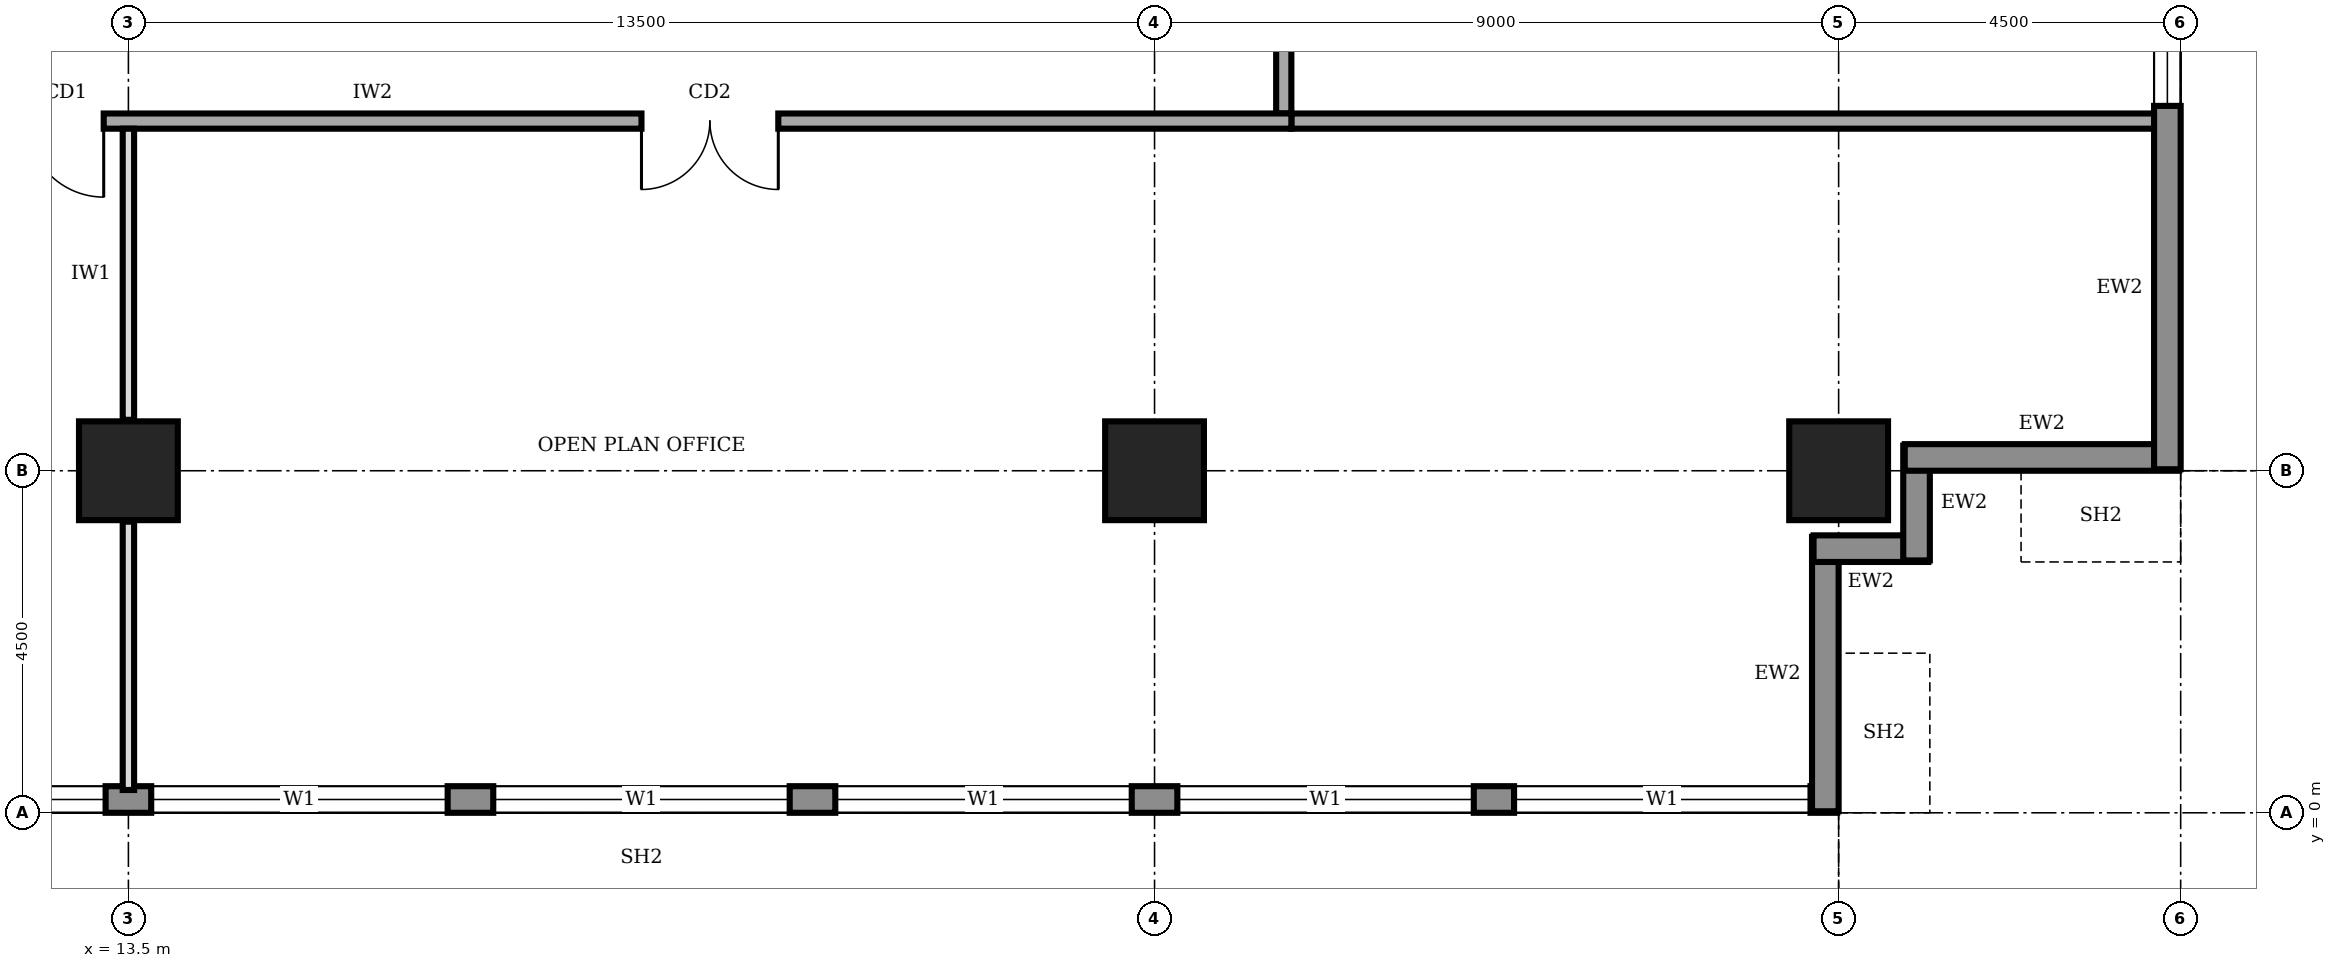
"""IFC4 building model, lengths in metres.
Left out: names, types, materials, properties, quantities, classifications, styles, units other than length and angle.
Written with IfcOpenShell. Run it as: python <this file> out.ifc"""

import sys

from ifc_helpers import new_model, si_unit, direction, frame, frame_2d, origin, origin_2d, place, context, subcontext, project, spatial, rectangle, extrude, element, fill, save


model = new_model("IFC4")
c1 = context("Model", 3, precision=1e-05, world=origin(), true_north=direction((0.0, 1.0)))
c2 = subcontext(c1, "Body", "Model", "MODEL_VIEW")
j1 = project(units=[si_unit("LENGTHUNIT", "METRE"), si_unit("PLANEANGLEUNIT", "RADIAN")], contexts=[c1])
p1 = place(None, origin())
s1 = spatial("IfcSite", under=j1, at=p1, CompositionType="ELEMENT")
p2 = place(p1, origin())
s2 = spatial("IfcBuilding", under=s1, at=p2, CompositionType="ELEMENT")
p3 = place(p2, frame((0.0, 0.0, 281.0)))
s3 = spatial("IfcBuildingStorey", under=s2, at=p3, CompositionType="ELEMENT", Elevation=281.0)
for number, where, z_axis, x_axis in (
    (1, (13.5, 4.5, 0.0), (0.0, 0.0, 1.0), (1.0, 0.0, 0.0)),
    (2, (27.0, 4.5, 0.0), (0.0, 0.0, 1.0), (1.0, 0.0, 0.0)),
    (3, (36.0, 4.5, 0.0), (0.0, 0.0, 1.0), (1.0, 0.0, 0.0)),
):
    element("IfcColumn", number, at=place(p3, frame(where, z_axis=z_axis, x_axis=x_axis)), inside=s3, PredefinedType="COLUMN", context=c2, shape_type="SweptSolid", body=[
        extrude(rectangle(XDim=1.3, YDim=1.3, at=origin_2d()), origin(), (0.0, 0.0, 1.0), 4.0),
    ])
p4 = place(p3, frame((4.52, 0.175, 0.0), z_axis=(0.0, 0.0, 1.0), x_axis=(1.0, 0.0, 0.0)))
e4 = element("IfcWall", 4, at=p4, inside=s3, PredefinedType="STANDARD", context=c2, shape_type="SweptSolid", body=[
    extrude(rectangle(XDim=31.46, YDim=0.35, at=frame_2d((15.73, 0.0))), origin(), (0.0, 0.0, 1.0), 3.75),
])
p5 = place(p4, frame((4.78, 0.0, 0.9)))
e5 = element("IfcOpeningElement", 5, at=p5, cuts=e4, PredefinedType="OPENING", context=c2, shape_type="SweptSolid", body=[
    extrude(rectangle(XDim=3.9, YDim=2.2, at=frame_2d((1.95, 1.1))), frame((0.0, 0.185, 0.0), z_axis=(0.0, -1.0, 0.0), x_axis=(1.0, 0.0, 0.0)), (0.0, 0.0, 1.0), 0.37),
])
p6 = place(p4, frame((9.28, 0.0, 0.9)))
e6 = element("IfcOpeningElement", 6, at=p6, cuts=e4, PredefinedType="OPENING", context=c2, shape_type="SweptSolid", body=[
    extrude(rectangle(XDim=3.9, YDim=2.2, at=frame_2d((1.95, 1.1))), frame((0.0, 0.185, 0.0), z_axis=(0.0, -1.0, 0.0), x_axis=(1.0, 0.0, 0.0)), (0.0, 0.0, 1.0), 0.37),
])
p7 = place(p4, frame((13.78, 0.0, 0.9)))
e7 = element("IfcOpeningElement", 7, at=p7, cuts=e4, PredefinedType="OPENING", context=c2, shape_type="SweptSolid", body=[
    extrude(rectangle(XDim=3.9, YDim=2.2, at=frame_2d((1.95, 1.1))), frame((0.0, 0.185, 0.0), z_axis=(0.0, -1.0, 0.0), x_axis=(1.0, 0.0, 0.0)), (0.0, 0.0, 1.0), 0.37),
])
p8 = place(p4, frame((18.28, 0.0, 0.9)))
e8 = element("IfcOpeningElement", 8, at=p8, cuts=e4, PredefinedType="OPENING", context=c2, shape_type="SweptSolid", body=[
    extrude(rectangle(XDim=3.9, YDim=2.2, at=frame_2d((1.95, 1.1))), frame((0.0, 0.185, 0.0), z_axis=(0.0, -1.0, 0.0), x_axis=(1.0, 0.0, 0.0)), (0.0, 0.0, 1.0), 0.37),
])
p9 = place(p4, frame((22.78, 0.0, 0.9)))
e9 = element("IfcOpeningElement", 9, at=p9, cuts=e4, PredefinedType="OPENING", context=c2, shape_type="SweptSolid", body=[
    extrude(rectangle(XDim=3.9, YDim=2.2, at=frame_2d((1.95, 1.1))), frame((0.0, 0.185, 0.0), z_axis=(0.0, -1.0, 0.0), x_axis=(1.0, 0.0, 0.0)), (0.0, 0.0, 1.0), 0.37),
])
p10 = place(p4, frame((27.21, 0.0, 0.9)))
e10 = element("IfcOpeningElement", 10, at=p10, cuts=e4, PredefinedType="OPENING", context=c2, shape_type="SweptSolid", body=[
    extrude(rectangle(XDim=3.9, YDim=2.2, at=frame_2d((1.95, 1.1))), frame((0.0, 0.185, 0.0), z_axis=(0.0, -1.0, 0.0), x_axis=(1.0, 0.0, 0.0)), (0.0, 0.0, 1.0), 0.37),
])
p11 = place(p3, frame((35.825, 0.02, 0.0), z_axis=(0.0, 0.0, 1.0), x_axis=(0.0, 1.0, 0.0)))
e11 = element("IfcWall", 11, at=p11, inside=s3, PredefinedType="STANDARD", context=c2, shape_type="SweptSolid", body=[
    extrude(rectangle(XDim=3.61, YDim=0.35, at=frame_2d((1.805, 0.0))), origin(), (0.0, 0.0, 1.0), 2.85),
])
for number, where, z_axis, x_axis in (
    (12, (35.67, 3.475, 0.0), (0.0, 0.0, 1.0), (1.0, 0.0, 0.0)),
    (13, (37.025, 3.32, 0.0), (0.0, 0.0, 1.0), (0.0, 1.0, 0.0)),
):
    element("IfcWall", number, at=place(p3, frame(where, z_axis=z_axis, x_axis=x_axis)), inside=s3, PredefinedType="STANDARD", context=c2, shape_type="SweptSolid", body=[
        extrude(rectangle(XDim=1.51, YDim=0.35, at=frame_2d((0.755, 0.0))), origin(), (0.0, 0.0, 1.0), 3.75),
    ])
p12 = place(p3, frame((36.87, 4.675, 0.0), z_axis=(0.0, 0.0, 1.0), x_axis=(1.0, 0.0, 0.0)))
e14 = element("IfcWall", 14, at=p12, inside=s3, PredefinedType="STANDARD", context=c2, shape_type="SweptSolid", body=[
    extrude(rectangle(XDim=3.61, YDim=0.35, at=frame_2d((1.805, 0.0))), origin(), (0.0, 0.0, 1.0), 2.85),
])
p13 = place(p3, frame((40.325, 4.52, 0.0), z_axis=(0.0, 0.0, 1.0), x_axis=(0.0, 1.0, 0.0)))
e15 = element("IfcWall", 15, at=p13, inside=s3, PredefinedType="STANDARD", context=c2, shape_type="SweptSolid", body=[
    extrude(rectangle(XDim=31.46, YDim=0.35, at=frame_2d((15.73, 0.0))), origin(), (0.0, 0.0, 1.0), 3.75),
])
p14 = place(p13, frame((4.78, 0.0, 0.9)))
e16 = element("IfcOpeningElement", 16, at=p14, cuts=e15, PredefinedType="OPENING", context=c2, shape_type="SweptSolid", body=[
    extrude(rectangle(XDim=3.9, YDim=2.2, at=frame_2d((1.95, 1.1))), frame((0.0, 0.185, 0.0), z_axis=(0.0, -1.0, 0.0), x_axis=(1.0, 0.0, 0.0)), (0.0, 0.0, 1.0), 0.37),
])
p15 = place(p13, frame((9.28, 0.0, 0.9)))
e17 = element("IfcOpeningElement", 17, at=p15, cuts=e15, PredefinedType="OPENING", context=c2, shape_type="SweptSolid", body=[
    extrude(rectangle(XDim=3.9, YDim=2.2, at=frame_2d((1.95, 1.1))), frame((0.0, 0.185, 0.0), z_axis=(0.0, -1.0, 0.0), x_axis=(1.0, 0.0, 0.0)), (0.0, 0.0, 1.0), 0.37),
])
p16 = place(p13, frame((13.78, 0.0, 0.9)))
e18 = element("IfcOpeningElement", 18, at=p16, cuts=e15, PredefinedType="OPENING", context=c2, shape_type="SweptSolid", body=[
    extrude(rectangle(XDim=3.9, YDim=2.2, at=frame_2d((1.95, 1.1))), frame((0.0, 0.185, 0.0), z_axis=(0.0, -1.0, 0.0), x_axis=(1.0, 0.0, 0.0)), (0.0, 0.0, 1.0), 0.37),
])
p17 = place(p13, frame((18.28, 0.0, 0.9)))
e19 = element("IfcOpeningElement", 19, at=p17, cuts=e15, PredefinedType="OPENING", context=c2, shape_type="SweptSolid", body=[
    extrude(rectangle(XDim=3.9, YDim=2.2, at=frame_2d((1.95, 1.1))), frame((0.0, 0.185, 0.0), z_axis=(0.0, -1.0, 0.0), x_axis=(1.0, 0.0, 0.0)), (0.0, 0.0, 1.0), 0.37),
])
p18 = place(p13, frame((22.78, 0.0, 0.9)))
e20 = element("IfcOpeningElement", 20, at=p18, cuts=e15, PredefinedType="OPENING", context=c2, shape_type="SweptSolid", body=[
    extrude(rectangle(XDim=3.9, YDim=2.2, at=frame_2d((1.95, 1.1))), frame((0.0, 0.185, 0.0), z_axis=(0.0, -1.0, 0.0), x_axis=(1.0, 0.0, 0.0)), (0.0, 0.0, 1.0), 0.37),
])
p19 = place(p13, frame((27.21, 0.0, 0.9)))
e21 = element("IfcOpeningElement", 21, at=p19, cuts=e15, PredefinedType="OPENING", context=c2, shape_type="SweptSolid", body=[
    extrude(rectangle(XDim=3.9, YDim=2.2, at=frame_2d((1.95, 1.1))), frame((0.0, 0.185, 0.0), z_axis=(0.0, -1.0, 0.0), x_axis=(1.0, 0.0, 0.0)), (0.0, 0.0, 1.0), 0.37),
])
p20 = place(p3, frame((11.9, 9.1, 0.0), z_axis=(0.0, 0.0, 1.0), x_axis=(1.0, 0.0, 0.0)))
e22 = element("IfcWall", 22, at=p20, inside=s3, PredefinedType="SOLIDWALL", context=c2, shape_type="SweptSolid", body=[
    extrude(rectangle(XDim=16.9, YDim=0.2, at=frame_2d((8.45, 0.0))), origin(), (0.0, 0.0, 1.0), 3.75),
])
p21 = place(p20, frame((0.275, 0.0, 0.0)))
e23 = element("IfcOpeningElement", 23, at=p21, cuts=e22, PredefinedType="OPENING", context=c2, shape_type="SweptSolid", body=[
    extrude(rectangle(XDim=1.0, YDim=2.1, at=frame_2d((0.5, 1.05))), frame((0.0, 0.11, 0.0), z_axis=(0.0, -1.0, 0.0), x_axis=(1.0, 0.0, 0.0)), (0.0, 0.0, 1.0), 0.22),
])
p22 = place(p20, frame((8.35, 0.0, 0.0)))
e24 = element("IfcOpeningElement", 24, at=p22, cuts=e22, PredefinedType="OPENING", context=c2, shape_type="SweptSolid", body=[
    extrude(rectangle(XDim=1.8, YDim=2.1, at=frame_2d((0.9, 1.05))), frame((0.0, 0.11, 0.0), z_axis=(0.0, -1.0, 0.0), x_axis=(1.0, 0.0, 0.0)), (0.0, 0.0, 1.0), 0.22),
])
p23 = place(p3, frame((28.7, 9.2, 0.0), z_axis=(0.0, 0.0, 1.0), x_axis=(0.0, 1.0, 0.0)))
e25 = element("IfcWall", 25, at=p23, inside=s3, PredefinedType="SOLIDWALL", context=c2, shape_type="SweptSolid", body=[
    extrude(rectangle(XDim=23.8, YDim=0.2, at=frame_2d((11.9, 0.0))), origin(), (0.0, 0.0, 1.0), 3.75),
])
p24 = place(p23, frame((3.4, 0.0, 0.0)))
e26 = element("IfcOpeningElement", 26, at=p24, cuts=e25, PredefinedType="OPENING", context=c2, shape_type="SweptSolid", body=[
    extrude(rectangle(XDim=1.8, YDim=2.1, at=frame_2d((0.9, 1.05))), frame((0.0, 0.11, 0.0), z_axis=(0.0, -1.0, 0.0), x_axis=(1.0, 0.0, 0.0)), (0.0, 0.0, 1.0), 0.22),
])
p25 = place(p23, frame((10.55, 0.0, 0.0)))
e27 = element("IfcOpeningElement", 27, at=p25, cuts=e25, PredefinedType="OPENING", context=c2, shape_type="SweptSolid", body=[
    extrude(rectangle(XDim=1.0, YDim=2.1, at=frame_2d((0.5, 1.05))), frame((0.0, 0.11, 0.0), z_axis=(0.0, -1.0, 0.0), x_axis=(1.0, 0.0, 0.0)), (0.0, 0.0, 1.0), 0.22),
])
p26 = place(p23, frame((17.65, 0.0, 0.0)))
e28 = element("IfcOpeningElement", 28, at=p26, cuts=e25, PredefinedType="OPENING", context=c2, shape_type="SweptSolid", body=[
    extrude(rectangle(XDim=1.8, YDim=2.1, at=frame_2d((0.9, 1.05))), frame((0.0, 0.11, 0.0), z_axis=(0.0, -1.0, 0.0), x_axis=(1.0, 0.0, 0.0)), (0.0, 0.0, 1.0), 0.22),
])
p27 = place(p3, frame((28.8, 9.1, 0.0), z_axis=(0.0, 0.0, 1.0), x_axis=(1.0, 0.0, 0.0)))
e29 = element("IfcWall", 29, at=p27, inside=s3, PredefinedType="SOLIDWALL", context=c2, shape_type="SweptSolid", body=[
    extrude(rectangle(XDim=11.4, YDim=0.2, at=frame_2d((5.7, 0.0))), origin(), (0.0, 0.0, 1.0), 3.75),
])
p28 = place(p3, frame((13.5, 0.3, 0.0), z_axis=(0.0, 0.0, 1.0), x_axis=(0.0, 1.0, 0.0)))
e30 = element("IfcWall", 30, at=p28, inside=s3, PredefinedType="PARTITIONING", context=c2, shape_type="SweptSolid", body=[
    extrude(rectangle(XDim=3.53, YDim=0.15, at=frame_2d((1.765, 0.0))), origin(), (0.0, 0.0, 1.0), 2.85),
])
p29 = place(p3, frame((13.5, 5.17, 0.0), z_axis=(0.0, 0.0, 1.0), x_axis=(0.0, 1.0, 0.0)))
e31 = element("IfcWall", 31, at=p29, inside=s3, PredefinedType="PARTITIONING", context=c2, shape_type="SweptSolid", body=[
    extrude(rectangle(XDim=3.83, YDim=0.15, at=frame_2d((1.915, 0.0))), origin(), (0.0, 0.0, 1.0), 2.85),
])
p30 = place(p5, origin())
e32 = element("IfcWindow", 32, at=p30, inside=s3, PartitioningType="SINGLE_PANEL", PredefinedType="WINDOW", context=c2, shape_type="SweptSolid", body=[
    extrude(rectangle(XDim=3.9, YDim=2.2, at=frame_2d((1.95, 1.1))), frame((0.0, 0.03, 0.0), z_axis=(0.0, -1.0, 0.0), x_axis=(1.0, 0.0, 0.0)), (0.0, 0.0, 1.0), 0.06),
])
fill(e5, e32)
p31 = place(p6, origin())
e33 = element("IfcWindow", 33, at=p31, inside=s3, PartitioningType="SINGLE_PANEL", PredefinedType="WINDOW", context=c2, shape_type="SweptSolid", body=[
    extrude(rectangle(XDim=3.9, YDim=2.2, at=frame_2d((1.95, 1.1))), frame((0.0, 0.03, 0.0), z_axis=(0.0, -1.0, 0.0), x_axis=(1.0, 0.0, 0.0)), (0.0, 0.0, 1.0), 0.06),
])
fill(e6, e33)
p32 = place(p7, origin())
e34 = element("IfcWindow", 34, at=p32, inside=s3, PartitioningType="SINGLE_PANEL", PredefinedType="WINDOW", context=c2, shape_type="SweptSolid", body=[
    extrude(rectangle(XDim=3.9, YDim=2.2, at=frame_2d((1.95, 1.1))), frame((0.0, 0.03, 0.0), z_axis=(0.0, -1.0, 0.0), x_axis=(1.0, 0.0, 0.0)), (0.0, 0.0, 1.0), 0.06),
])
fill(e7, e34)
p33 = place(p8, origin())
e35 = element("IfcWindow", 35, at=p33, inside=s3, PartitioningType="SINGLE_PANEL", PredefinedType="WINDOW", context=c2, shape_type="SweptSolid", body=[
    extrude(rectangle(XDim=3.9, YDim=2.2, at=frame_2d((1.95, 1.1))), frame((0.0, 0.03, 0.0), z_axis=(0.0, -1.0, 0.0), x_axis=(1.0, 0.0, 0.0)), (0.0, 0.0, 1.0), 0.06),
])
fill(e8, e35)
p34 = place(p9, origin())
e36 = element("IfcWindow", 36, at=p34, inside=s3, PartitioningType="SINGLE_PANEL", PredefinedType="WINDOW", context=c2, shape_type="SweptSolid", body=[
    extrude(rectangle(XDim=3.9, YDim=2.2, at=frame_2d((1.95, 1.1))), frame((0.0, 0.03, 0.0), z_axis=(0.0, -1.0, 0.0), x_axis=(1.0, 0.0, 0.0)), (0.0, 0.0, 1.0), 0.06),
])
fill(e9, e36)
p35 = place(p10, origin())
e37 = element("IfcWindow", 37, at=p35, inside=s3, PartitioningType="SINGLE_PANEL", PredefinedType="WINDOW", context=c2, shape_type="SweptSolid", body=[
    extrude(rectangle(XDim=3.9, YDim=2.2, at=frame_2d((1.95, 1.1))), frame((0.0, 0.03, 0.0), z_axis=(0.0, -1.0, 0.0), x_axis=(1.0, 0.0, 0.0)), (0.0, 0.0, 1.0), 0.06),
])
fill(e10, e37)
p36 = place(p14, origin())
e38 = element("IfcWindow", 38, at=p36, inside=s3, PartitioningType="SINGLE_PANEL", PredefinedType="WINDOW", context=c2, shape_type="SweptSolid", body=[
    extrude(rectangle(XDim=3.9, YDim=2.2, at=frame_2d((1.95, 1.1))), frame((0.0, 0.03, 0.0), z_axis=(0.0, -1.0, 0.0), x_axis=(1.0, 0.0, 0.0)), (0.0, 0.0, 1.0), 0.06),
])
fill(e16, e38)
p37 = place(p21, frame((1.0, 0.0, 0.0), z_axis=(0.0, 0.0, 1.0), x_axis=(-1.0, 0.0, 0.0)))
e39 = element("IfcDoor", 39, at=p37, inside=s3, OperationType="SINGLE_SWING_LEFT", PredefinedType="DOOR", context=c2, shape_type="SweptSolid", body=[
    extrude(rectangle(XDim=1.0, YDim=2.1, at=frame_2d((0.5, 1.05))), frame((0.0, 0.025, 0.0), z_axis=(0.0, -1.0, 0.0), x_axis=(1.0, 0.0, 0.0)), (0.0, 0.0, 1.0), 0.05),
])
fill(e23, e39)
p38 = place(p22, frame((1.8, 0.0, 0.0), z_axis=(0.0, 0.0, 1.0), x_axis=(-1.0, 0.0, 0.0)))
e40 = element("IfcDoor", 40, at=p38, inside=s3, OperationType="DOUBLE_DOOR_SINGLE_SWING", PredefinedType="DOOR", context=c2, shape_type="SweptSolid", body=[
    extrude(rectangle(XDim=1.8, YDim=2.1, at=frame_2d((0.9, 1.05))), frame((0.0, 0.025, 0.0), z_axis=(0.0, -1.0, 0.0), x_axis=(1.0, 0.0, 0.0)), (0.0, 0.0, 1.0), 0.05),
])
fill(e24, e40)
save(model, sys.argv[1])
